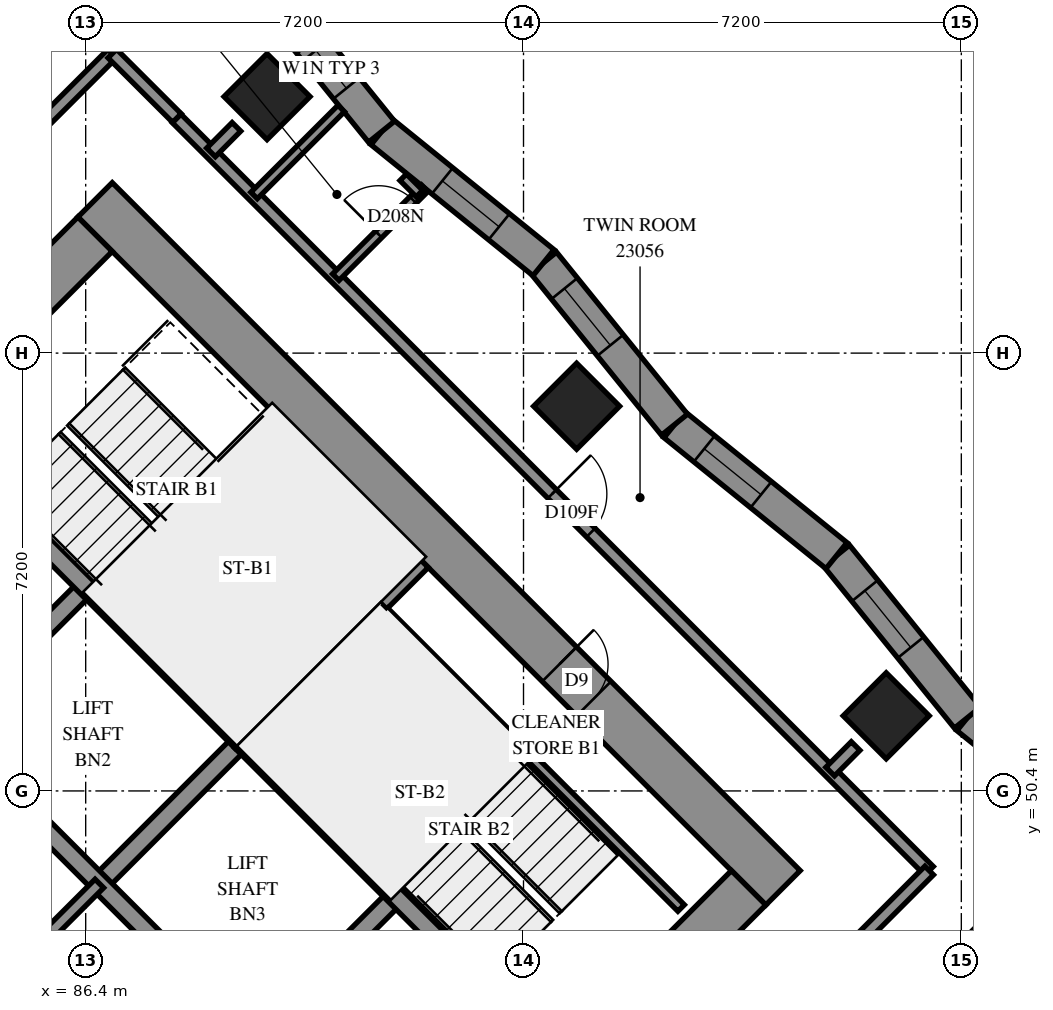
"""IFC4 building model, lengths in metres.
Left out: names, types, materials, properties, quantities, classifications, styles, units other than length and angle.
Written with IfcOpenShell. Run it as: python <this file> out.ifc"""

import sys

from ifc_helpers import new_model, si_unit, direction, frame, frame_2d, origin, origin_2d, place, context, subcontext, project, spatial, polyline, rectangle, outline, extrude, element, fill, save


model = new_model("IFC4")
c1 = context("Model", 3, precision=1e-05, world=origin(), true_north=direction((0.0, 1.0)))
c2 = subcontext(c1, "Body", "Model", "MODEL_VIEW")
j1 = project(units=[si_unit("LENGTHUNIT", "METRE"), si_unit("PLANEANGLEUNIT", "RADIAN")], contexts=[c1])
p1 = place(None, origin())
s1 = spatial("IfcSite", under=j1, at=p1, CompositionType="ELEMENT")
p2 = place(p1, origin())
s2 = spatial("IfcBuilding", under=s1, at=p2, CompositionType="ELEMENT")
p3 = place(p2, frame((0.0, 0.0, 88.0)))
s3 = spatial("IfcBuildingStorey", under=s2, at=p3, CompositionType="ELEMENT", Elevation=88.0)
for number, where, z_axis, x_axis in (
    (1, (89.382, 61.818, 0.0), (0.0, 0.0, 1.0), (0.707, -0.707, 0.0)),
    (2, (94.474, 56.727, 0.0), (0.0, 0.0, 1.0), (0.707, -0.707, 0.0)),
    (3, (99.565, 51.635, 0.0), (0.0, 0.0, 1.0), (0.707, -0.707, 0.0)),
):
    element("IfcColumn", number, at=place(p3, frame(where, z_axis=z_axis, x_axis=x_axis)), inside=s3, PredefinedType="COLUMN", context=c2, shape_type="SweptSolid", body=[
        extrude(rectangle(XDim=1.0, YDim=1.0, at=origin_2d()), origin(), (0.0, 0.0, 1.0), 3.1),
    ])
p4 = place(p3, frame((75.806, 49.373, -0.3), z_axis=(0.0, 0.0, 1.0), x_axis=(0.7071067812, -0.7071067812, 0.0)))
e4 = element("IfcWall", 4, at=p4, inside=s3, PredefinedType="SHEAR", context=c2, shape_type="SweptSolid", body=[
    extrude(rectangle(XDim=16.0, YDim=0.8, at=frame_2d((8.0, 0.0))), origin(), (0.0, 0.0, 1.0), 2.7),
])
p5 = place(p3, frame((86.554, 60.121, -0.3), z_axis=(0.0, 0.0, 1.0), x_axis=(0.7071067812, -0.7071067812, 0.0)))
e5 = element("IfcWall", 5, at=p5, inside=s3, PredefinedType="SHEAR", context=c2, shape_type="SweptSolid", body=[
    extrude(rectangle(XDim=16.0, YDim=0.8, at=frame_2d((8.0, 0.0))), origin(), (0.0, 0.0, 1.0), 2.7),
])
p6 = place(p5, frame((10.8, 0.0, 0.3)))
e6 = element("IfcOpeningElement", 6, at=p6, cuts=e5, PredefinedType="OPENING", context=c2, shape_type="SweptSolid", body=[
    extrude(rectangle(XDim=0.8, YDim=2.1, at=frame_2d((0.4, 1.05))), frame((0.0, 0.41, 0.0), z_axis=(0.0, -1.0, 0.0), x_axis=(1.0, 0.0, 0.0)), (0.0, 0.0, 1.0), 0.82),
])
p7 = place(p3, frame((76.372, 49.373, -0.3), z_axis=(0.0, 0.0, 1.0), x_axis=(0.7071067812, 0.7071067812, 0.0)))
e7 = element("IfcWall", 7, at=p7, inside=s3, PredefinedType="SHEAR", context=c2, shape_type="SweptSolid", body=[
    extrude(rectangle(XDim=14.4, YDim=0.8, at=frame_2d((7.2, 0.0))), origin(), (0.0, 0.0, 1.0), 2.7),
])
p8 = place(p7, frame((4.55, 0.0, 0.3)))
e8 = element("IfcOpeningElement", 8, at=p8, cuts=e7, PredefinedType="OPENING", context=c2, shape_type="SweptSolid", body=[
    extrude(rectangle(XDim=1.1, YDim=2.1, at=frame_2d((0.55, 1.05))), frame((0.0, 0.41, 0.0), z_axis=(0.0, -1.0, 0.0), x_axis=(1.0, 0.0, 0.0)), (0.0, 0.0, 1.0), 0.82),
])
p9 = place(p7, frame((11.35, 0.0, 0.3)))
e9 = element("IfcOpeningElement", 9, at=p9, cuts=e7, PredefinedType="OPENING", context=c2, shape_type="SweptSolid", body=[
    extrude(rectangle(XDim=1.1, YDim=2.1, at=frame_2d((0.55, 1.05))), frame((0.0, 0.41, 0.0), z_axis=(0.0, -1.0, 0.0), x_axis=(1.0, 0.0, 0.0)), (0.0, 0.0, 1.0), 0.82),
])
p10 = place(p3, frame((87.12, 38.625, -0.3), z_axis=(0.0, 0.0, 1.0), x_axis=(0.7071067812, 0.7071067812, 0.0)))
e10 = element("IfcWall", 10, at=p10, inside=s3, PredefinedType="SHEAR", context=c2, shape_type="SweptSolid", body=[
    extrude(rectangle(XDim=14.4, YDim=0.8, at=frame_2d((7.2, 0.0))), origin(), (0.0, 0.0, 1.0), 2.7),
])
p11 = place(p10, frame((4.55, 0.0, 0.3)))
e11 = element("IfcOpeningElement", 11, at=p11, cuts=e10, PredefinedType="OPENING", context=c2, shape_type="SweptSolid", body=[
    extrude(rectangle(XDim=1.1, YDim=2.1, at=frame_2d((0.55, 1.05))), frame((0.0, 0.41, 0.0), z_axis=(0.0, -1.0, 0.0), x_axis=(1.0, 0.0, 0.0)), (0.0, 0.0, 1.0), 0.82),
])
p12 = place(p10, frame((11.35, 0.0, 0.3)))
e12 = element("IfcOpeningElement", 12, at=p12, cuts=e10, PredefinedType="OPENING", context=c2, shape_type="SweptSolid", body=[
    extrude(rectangle(XDim=1.1, YDim=2.1, at=frame_2d((0.55, 1.05))), frame((0.0, 0.41, 0.0), z_axis=(0.0, -1.0, 0.0), x_axis=(1.0, 0.0, 0.0)), (0.0, 0.0, 1.0), 0.82),
])
p13 = place(p3, frame((84.079, 51.423, 0.0), z_axis=(0.0, 0.0, 1.0), x_axis=(0.7071219326, 0.7070916295, 0.0)))
e13 = element("IfcWall", 13, at=p13, inside=s3, PredefinedType="SOLIDWALL", context=c2, shape_type="SweptSolid", body=[
    extrude(rectangle(XDim=3.3, YDim=0.3, at=frame_2d((1.65, 0.0))), origin(), (0.0, 0.0, 1.0), 3.1),
])
for number, where, z_axis, x_axis in (
    (14, (86.625, 48.878, 0.0), (0.0, 0.0, 1.0), (0.707, 0.707, 0.0)),
    (15, (89.17, 46.332, 0.0), (0.0, 0.0, 1.0), (0.707, 0.707, 0.0)),
):
    element("IfcWall", number, at=place(p3, frame(where, z_axis=z_axis, x_axis=x_axis)), inside=s3, PredefinedType="SOLIDWALL", context=c2, shape_type="SweptSolid", body=[
        extrude(rectangle(XDim=3.3, YDim=0.3, at=frame_2d((1.65, 0.0))), origin(), (0.0, 0.0, 1.0), 3.1),
    ])
p14 = place(p3, frame((78.988, 51.423, 0.0), z_axis=(0.0, 0.0, 1.0), x_axis=(0.7071067812, -0.7071067812, 0.0)))
e16 = element("IfcWall", 16, at=p14, inside=s3, PredefinedType="SOLIDWALL", context=c2, shape_type="SweptSolid", body=[
    extrude(rectangle(XDim=14.4, YDim=0.3, at=frame_2d((7.2, 0.0))), origin(), (0.0, 0.0, 1.0), 3.1),
])
p15 = place(p14, frame((1.25, 0.0, 0.0)))
e17 = element("IfcOpeningElement", 17, at=p15, cuts=e16, PredefinedType="OPENING", context=c2, shape_type="SweptSolid", body=[
    extrude(rectangle(XDim=1.1, YDim=2.1, at=frame_2d((0.55, 1.05))), frame((0.0, 0.16, 0.0), z_axis=(0.0, -1.0, 0.0), x_axis=(1.0, 0.0, 0.0)), (0.0, 0.0, 1.0), 0.32),
])
p16 = place(p14, frame((4.85, 0.0, 0.0)))
e18 = element("IfcOpeningElement", 18, at=p16, cuts=e16, PredefinedType="OPENING", context=c2, shape_type="SweptSolid", body=[
    extrude(rectangle(XDim=1.1, YDim=2.1, at=frame_2d((0.55, 1.05))), frame((0.0, 0.16, 0.0), z_axis=(0.0, -1.0, 0.0), x_axis=(1.0, 0.0, 0.0)), (0.0, 0.0, 1.0), 0.32),
])
p17 = place(p14, frame((8.45, 0.0, 0.0)))
e19 = element("IfcOpeningElement", 19, at=p17, cuts=e16, PredefinedType="OPENING", context=c2, shape_type="SweptSolid", body=[
    extrude(rectangle(XDim=1.1, YDim=2.1, at=frame_2d((0.55, 1.05))), frame((0.0, 0.16, 0.0), z_axis=(0.0, -1.0, 0.0), x_axis=(1.0, 0.0, 0.0)), (0.0, 0.0, 1.0), 0.32),
])
p18 = place(p14, frame((12.05, 0.0, 0.0)))
e20 = element("IfcOpeningElement", 20, at=p18, cuts=e16, PredefinedType="OPENING", context=c2, shape_type="SweptSolid", body=[
    extrude(rectangle(XDim=1.1, YDim=2.1, at=frame_2d((0.55, 1.05))), frame((0.0, 0.16, 0.0), z_axis=(0.0, -1.0, 0.0), x_axis=(1.0, 0.0, 0.0)), (0.0, 0.0, 1.0), 0.32),
])
p19 = place(p3, frame((81.534, 53.969, 0.0), z_axis=(0.0, 0.0, 1.0), x_axis=(0.707103309, -0.7071102534, 0.0)))
e21 = element("IfcWall", 21, at=p19, inside=s3, PredefinedType="SOLIDWALL", context=c2, shape_type="SweptSolid", body=[
    extrude(rectangle(XDim=14.4, YDim=0.3, at=frame_2d((7.2, 0.0))), origin(), (0.0, 0.0, 1.0), 3.1),
])
p20 = place(p19, frame((12.05, 0.0, 0.0)))
e22 = element("IfcOpeningElement", 22, at=p20, cuts=e21, PredefinedType="OPENING", context=c2, shape_type="SweptSolid", body=[
    extrude(rectangle(XDim=1.1, YDim=2.1, at=frame_2d((0.55, 1.05))), frame((0.0, 0.16, 0.0), z_axis=(0.0, -1.0, 0.0), x_axis=(1.0, 0.0, 0.0)), (0.0, 0.0, 1.0), 0.32),
])
for number, where, z_axis, x_axis in (
    (23, (83.867, 56.302, 0.0), (0.0, 0.0, 1.0), (0.707, -0.707, 0.0)),
    (24, (88.958, 51.211, 0.0), (0.0, 0.0, 1.0), (0.707, -0.707, 0.0)),
):
    element("IfcWall", number, at=place(p3, frame(where, z_axis=z_axis, x_axis=x_axis)), inside=s3, PredefinedType="SOLIDWALL", context=c2, shape_type="SweptSolid", body=[
        extrude(rectangle(XDim=7.2, YDim=0.3, at=frame_2d((3.6, 0.0))), origin(), (0.0, 0.0, 1.0), 3.1),
    ])
p21 = place(p3, frame((88.958, 51.211, 0.0), z_axis=(0.0, 0.0, 1.0), x_axis=(0.7071067812, 0.7071067812, 0.0)))
e25 = element("IfcWall", 25, at=p21, inside=s3, PredefinedType="SOLIDWALL", context=c2, shape_type="SweptSolid", body=[
    extrude(rectangle(XDim=4.2, YDim=0.3, at=frame_2d((2.1, 0.0))), origin(), (0.0, 0.0, 1.0), 3.1),
])
p22 = place(p3, frame((103.565, 49.452, 0.0), z_axis=(0.0, 0.0, 1.0), x_axis=(-0.777689233, 0.6286489138, 0.0)))
e26 = element("IfcWall", 26, at=p22, inside=s3, PredefinedType="SOLIDWALL", context=c2, shape_type="SweptSolid", body=[
    extrude(outline(polyline([(-0.029, -0.275), (3.397, -0.275), (3.455, 0.275), (0.029, 0.275), (-0.029, -0.275)])), origin(), (0.0, 0.0, 1.0), 3.1),
])
p23 = place(p22, frame((1.401, 0.0, 0.5)))
e27 = element("IfcOpeningElement", 27, at=p23, cuts=e26, PredefinedType="OPENING", context=c2, shape_type="SweptSolid", body=[
    extrude(rectangle(XDim=1.2, YDim=2.45, at=frame_2d((0.6, 1.225))), frame((0.0, 0.285, 0.0), z_axis=(0.0, -1.0, 0.0), x_axis=(1.0, 0.0, 0.0)), (0.0, 0.0, 1.0), 0.57),
])
p24 = place(p3, frame((100.901, 51.605, 0.0), z_axis=(0.0, 0.0, 1.0), x_axis=(-0.6286631845, 0.777677697, 0.0)))
e28 = element("IfcWall", 28, at=p24, inside=s3, PredefinedType="SOLIDWALL", context=c2, shape_type="SweptSolid", body=[
    extrude(outline(polyline([(0.029, -0.275), (3.455, -0.275), (3.397, 0.275), (-0.029, 0.275), (0.029, -0.275)])), origin(), (0.0, 0.0, 1.0), 3.1),
])
p25 = place(p24, frame((1.484, 0.0, 0.5)))
e29 = element("IfcOpeningElement", 29, at=p25, cuts=e28, PredefinedType="OPENING", context=c2, shape_type="SweptSolid", body=[
    extrude(rectangle(XDim=1.2, YDim=2.45, at=frame_2d((0.6, 1.225))), frame((0.0, 0.285, 0.0), z_axis=(0.0, -1.0, 0.0), x_axis=(1.0, 0.0, 0.0)), (0.0, 0.0, 1.0), 0.57),
])
p26 = place(p3, frame((98.747, 54.269, 0.0), z_axis=(0.0, 0.0, 1.0), x_axis=(-0.777677697, 0.6286631845, 0.0)))
e30 = element("IfcWall", 30, at=p26, inside=s3, PredefinedType="SOLIDWALL", context=c2, shape_type="SweptSolid", body=[
    extrude(outline(polyline([(-0.029, -0.275), (3.397, -0.275), (3.455, 0.275), (0.029, 0.275), (-0.029, -0.275)])), origin(), (0.0, 0.0, 1.0), 3.1),
])
p27 = place(p26, frame((1.596, 0.0, 0.5)))
e31 = element("IfcOpeningElement", 31, at=p27, cuts=e30, PredefinedType="OPENING", context=c2, shape_type="SweptSolid", body=[
    extrude(rectangle(XDim=1.2, YDim=2.45, at=frame_2d((0.6, 1.225))), frame((0.0, 0.285, 0.0), z_axis=(0.0, -1.0, 0.0), x_axis=(1.0, 0.0, 0.0)), (0.0, 0.0, 1.0), 0.57),
])
p28 = place(p3, frame((96.083, 56.423, 0.0), z_axis=(0.0, 0.0, 1.0), x_axis=(-0.6286489138, 0.777689233, 0.0)))
e32 = element("IfcWall", 32, at=p28, inside=s3, PredefinedType="SOLIDWALL", context=c2, shape_type="SweptSolid", body=[
    extrude(outline(polyline([(0.029, -0.275), (3.455, -0.275), (3.397, 0.275), (-0.029, 0.275), (0.029, -0.275)])), origin(), (0.0, 0.0, 1.0), 3.1),
])
p29 = place(p28, frame((1.678, 0.0, 0.5)))
e33 = element("IfcOpeningElement", 33, at=p29, cuts=e32, PredefinedType="OPENING", context=c2, shape_type="SweptSolid", body=[
    extrude(rectangle(XDim=1.2, YDim=2.45, at=frame_2d((0.6, 1.225))), frame((0.0, 0.285, 0.0), z_axis=(0.0, -1.0, 0.0), x_axis=(1.0, 0.0, 0.0)), (0.0, 0.0, 1.0), 0.57),
])
p30 = place(p3, frame((93.929, 59.087, 0.0), z_axis=(0.0, 0.0, 1.0), x_axis=(-0.777677697, 0.6286631845, 0.0)))
e34 = element("IfcWall", 34, at=p30, inside=s3, PredefinedType="SOLIDWALL", context=c2, shape_type="SweptSolid", body=[
    extrude(outline(polyline([(-0.029, -0.275), (3.397, -0.275), (3.455, 0.275), (0.029, 0.275), (-0.029, -0.275)])), origin(), (0.0, 0.0, 1.0), 3.1),
])
p31 = place(p30, frame((0.94, 0.0, 0.5)))
e35 = element("IfcOpeningElement", 35, at=p31, cuts=e34, PredefinedType="OPENING", context=c2, shape_type="SweptSolid", body=[
    extrude(rectangle(XDim=1.2, YDim=2.45, at=frame_2d((0.6, 1.225))), frame((0.0, 0.285, 0.0), z_axis=(0.0, -1.0, 0.0), x_axis=(1.0, 0.0, 0.0)), (0.0, 0.0, 1.0), 0.57),
])
p32 = place(p3, frame((91.265, 61.241, 0.0), z_axis=(0.0, 0.0, 1.0), x_axis=(-0.6286631845, 0.777677697, 0.0)))
e36 = element("IfcWall", 36, at=p32, inside=s3, PredefinedType="SOLIDWALL", context=c2, shape_type="SweptSolid", body=[
    extrude(outline(polyline([(0.029, -0.275), (3.455, -0.275), (3.397, 0.275), (-0.029, 0.275), (0.029, -0.275)])), origin(), (0.0, 0.0, 1.0), 3.1),
])
p33 = place(p32, frame((1.873, 0.0, 0.5)))
e37 = element("IfcOpeningElement", 37, at=p33, cuts=e36, PredefinedType="OPENING", context=c2, shape_type="SweptSolid", body=[
    extrude(rectangle(XDim=1.2, YDim=2.45, at=frame_2d((0.6, 1.225))), frame((0.0, 0.285, 0.0), z_axis=(0.0, -1.0, 0.0), x_axis=(1.0, 0.0, 0.0)), (0.0, 0.0, 1.0), 0.57),
])
p34 = place(p32, frame((0.918, 0.0, 0.45)))
e38 = element("IfcOpeningElement", 38, at=p34, cuts=e36, PredefinedType="OPENING", context=c2, shape_type="SweptSolid", body=[
    extrude(rectangle(XDim=0.8, YDim=2.5, at=frame_2d((0.4, 1.25))), frame((0.0, 0.285, 0.0), z_axis=(0.0, -1.0, 0.0), x_axis=(1.0, 0.0, 0.0)), (0.0, 0.0, 1.0), 0.57),
])
p35 = place(p3, frame((91.313, 53.354, 0.0), z_axis=(0.0, 0.0, 1.0), x_axis=(0.7071140275, -0.7070995348, 0.0)))
e39 = element("IfcWall", 39, at=p35, inside=s3, PredefinedType="PARTITIONING", context=c2, shape_type="SweptSolid", body=[
    extrude(rectangle(XDim=6.9, YDim=0.15, at=frame_2d((3.45, 0.0))), origin(), (0.0, 0.0, 1.0), 3.1),
])
p36 = place(p3, frame((84.079, 46.332, 0.0), z_axis=(0.0, 0.0, 1.0), x_axis=(0.7071067812, 0.7071067812, 0.0)))
e40 = element("IfcWall", 40, at=p36, inside=s3, PredefinedType="PARTITIONING", context=c2, shape_type="SweptSolid", body=[
    extrude(rectangle(XDim=3.6, YDim=0.2, at=frame_2d((1.8, 0.0))), origin(), (0.0, 0.0, 1.0), 3.1),
])
p37 = place(p3, frame((87.894, 61.461, 0.0), z_axis=(0.0, 0.0, 1.0), x_axis=(0.7071067812, -0.7071067812, 0.0)))
e41 = element("IfcWall", 41, at=p37, inside=s3, PredefinedType="PARTITIONING", context=c2, shape_type="SweptSolid", body=[
    extrude(rectangle(XDim=17.5, YDim=0.2, at=frame_2d((8.75, 0.0))), origin(), (0.0, 0.0, 1.0), 3.1),
])
p38 = place(p37, frame((8.735, 0.0, 0.0)))
e42 = element("IfcOpeningElement", 42, at=p38, cuts=e41, PredefinedType="OPENING", context=c2, shape_type="SweptSolid", body=[
    extrude(rectangle(XDim=0.9, YDim=2.1, at=frame_2d((0.45, 1.05))), frame((0.0, 0.11, 0.0), z_axis=(0.0, -1.0, 0.0), x_axis=(1.0, 0.0, 0.0)), (0.0, 0.0, 1.0), 0.22),
])
p39 = place(p3, frame((95.215, 42.197, 0.0), z_axis=(0.0, 0.0, 1.0), x_axis=(0.7071067812, 0.7071067812, 0.0)))
e43 = element("IfcWall", 43, at=p39, inside=s3, PredefinedType="PARTITIONING", context=c2, shape_type="SweptSolid", body=[
    extrude(rectangle(XDim=10.675, YDim=0.2, at=frame_2d((5.338, 0.0))), origin(), (0.0, 0.0, 1.0), 3.1),
])
p40 = place(p3, frame((80.949, 58.477, 0.0), z_axis=(0.0, 0.0, 1.0), x_axis=(0.7071122585, 0.7071013038, 0.0)))
e44 = element("IfcWall", 44, at=p40, inside=s3, PredefinedType="PARTITIONING", context=c2, shape_type="SweptSolid", body=[
    extrude(rectangle(XDim=9.129, YDim=0.2, at=frame_2d((4.564, 0.0))), origin(), (0.0, 0.0, 1.0), 3.1),
])
p41 = place(p3, frame((94.297, 43.117, 0.0), z_axis=(0.0, 0.0, 1.0), x_axis=(0.7071067812, 0.7071067812, 0.0)))
e45 = element("IfcWall", 45, at=p41, inside=s3, PredefinedType="PARTITIONING", context=c2, shape_type="SweptSolid", body=[
    extrude(rectangle(XDim=8.448, YDim=0.2, at=frame_2d((4.224, 0.0))), origin(), (0.0, 0.0, 1.0), 3.1),
])
p42 = place(p41, frame((0.242, 0.0, 0.0)))
e46 = element("IfcOpeningElement", 46, at=p42, cuts=e45, PredefinedType="OPENING", context=c2, shape_type="SweptSolid", body=[
    extrude(rectangle(XDim=1.0, YDim=2.1, at=frame_2d((0.5, 1.05))), frame((0.0, 0.11, 0.0), z_axis=(0.0, -1.0, 0.0), x_axis=(1.0, 0.0, 0.0)), (0.0, 0.0, 1.0), 0.22),
])
p43 = place(p3, frame((80.951, 56.641, 0.0), z_axis=(0.0, 0.0, 1.0), x_axis=(0.7071067812, 0.7071067812, 0.0)))
e47 = element("IfcWall", 47, at=p43, inside=s3, PredefinedType="PARTITIONING", context=c2, shape_type="SweptSolid", body=[
    extrude(rectangle(XDim=8.321, YDim=0.2, at=frame_2d((4.161, 0.0))), origin(), (0.0, 0.0, 1.0), 3.1),
])
p44 = place(p43, frame((0.816, 0.0, 0.0)))
e48 = element("IfcOpeningElement", 48, at=p44, cuts=e47, PredefinedType="OPENING", context=c2, shape_type="SweptSolid", body=[
    extrude(rectangle(XDim=1.0, YDim=2.1, at=frame_2d((0.5, 1.05))), frame((0.0, 0.11, 0.0), z_axis=(0.0, -1.0, 0.0), x_axis=(1.0, 0.0, 0.0)), (0.0, 0.0, 1.0), 0.22),
])
p45 = place(p3, frame((90.513, 58.849, 0.0), z_axis=(0.0, 0.0, 1.0), x_axis=(0.7071309413, 0.7070826202, 0.0)))
e49 = element("IfcWall", 49, at=p45, inside=s3, PredefinedType="PARTITIONING", context=c2, shape_type="SweptSolid", body=[
    extrude(rectangle(XDim=2.07, YDim=0.15, at=frame_2d((1.035, 0.0))), origin(), (0.0, 0.0, 1.0), 3.1),
])
p46 = place(p45, frame((0.996, 0.0, 0.0)))
e50 = element("IfcOpeningElement", 50, at=p46, cuts=e49, PredefinedType="OPENING", context=c2, shape_type="SweptSolid", body=[
    extrude(rectangle(XDim=0.8, YDim=2.1, at=frame_2d((0.4, 1.05))), frame((0.0, 0.085, 0.0), z_axis=(0.0, -1.0, 0.0), x_axis=(1.0, 0.0, 0.0)), (0.0, 0.0, 1.0), 0.17),
])
p47 = place(p3, frame((89.169, 60.193, 0.0), z_axis=(0.0, 0.0, 1.0), x_axis=(0.7076498168, 0.7065633282, 0.0)))
e51 = element("IfcWall", 51, at=p47, inside=s3, PredefinedType="PARTITIONING", context=c2, shape_type="SweptSolid", body=[
    extrude(rectangle(XDim=2.025, YDim=0.15, at=frame_2d((1.012, 0.0))), origin(), (0.0, 0.0, 1.0), 3.1),
])
p48 = place(p3, frame((86.838, 62.526, 0.0), z_axis=(0.0, 0.0, 1.0), x_axis=(0.70777292, -0.7064400143, 0.0)))
e52 = element("IfcWall", 52, at=p48, inside=s3, PredefinedType="PARTITIONING", context=c2, shape_type="SweptSolid", body=[
    extrude(rectangle(XDim=1.5, YDim=0.2, at=frame_2d((0.75, 0.0))), origin(), (0.0, 0.0, 1.0), 3.1),
])
for number, where, z_axis, x_axis in (
    (53, (88.461, 60.901, 0.0), (0.0, 0.0, 1.0), (0.705, 0.709, 0.0)),
    (54, (98.644, 50.718, 0.0), (0.0, 0.0, 1.0), (0.705, 0.709, 0.0)),
):
    element("IfcWall", number, at=place(p3, frame(where, z_axis=z_axis, x_axis=x_axis)), inside=s3, PredefinedType="PARTITIONING", context=c2, shape_type="SweptSolid", body=[
        extrude(rectangle(XDim=0.593, YDim=0.2, at=frame_2d((0.296, 0.0))), origin(), (0.0, 0.0, 1.0), 3.1),
    ])
p49 = place(p3, frame((91.621, 60.491, 0.0), z_axis=(0.0, 0.0, 1.0), x_axis=(0.7071067812, -0.7071067812, 0.0)))
e55 = element("IfcWall", 55, at=p49, inside=s3, PredefinedType="PARTITIONING", context=c2, shape_type="SweptSolid", body=[
    extrude(rectangle(XDim=0.379, YDim=0.15, at=frame_2d((0.19, 0.0))), origin(), (0.0, 0.0, 1.0), 3.1),
])
p50 = place(p25, origin())
e56 = element("IfcWindow", 56, at=p50, inside=s3, PartitioningType="SINGLE_PANEL", PredefinedType="WINDOW", context=c2, shape_type="SweptSolid", body=[
    extrude(rectangle(XDim=1.2, YDim=2.45, at=frame_2d((0.6, 1.225))), frame((0.0, 0.155, 0.0), z_axis=(0.0, -1.0, 0.0), x_axis=(1.0, 0.0, 0.0)), (0.0, 0.0, 1.0), 0.06),
])
fill(e29, e56)
p51 = place(p27, origin())
e57 = element("IfcWindow", 57, at=p51, inside=s3, PartitioningType="SINGLE_PANEL", PredefinedType="WINDOW", context=c2, shape_type="SweptSolid", body=[
    extrude(rectangle(XDim=1.2, YDim=2.45, at=frame_2d((0.6, 1.225))), frame((0.0, 0.155, 0.0), z_axis=(0.0, -1.0, 0.0), x_axis=(1.0, 0.0, 0.0)), (0.0, 0.0, 1.0), 0.06),
])
fill(e31, e57)
p52 = place(p29, origin())
e58 = element("IfcWindow", 58, at=p52, inside=s3, PartitioningType="SINGLE_PANEL", PredefinedType="WINDOW", context=c2, shape_type="SweptSolid", body=[
    extrude(rectangle(XDim=1.2, YDim=2.45, at=frame_2d((0.6, 1.225))), frame((0.0, 0.155, 0.0), z_axis=(0.0, -1.0, 0.0), x_axis=(1.0, 0.0, 0.0)), (0.0, 0.0, 1.0), 0.06),
])
fill(e33, e58)
p53 = place(p31, origin())
e59 = element("IfcWindow", 59, at=p53, inside=s3, PartitioningType="SINGLE_PANEL", PredefinedType="WINDOW", context=c2, shape_type="SweptSolid", body=[
    extrude(rectangle(XDim=1.2, YDim=2.45, at=frame_2d((0.6, 1.225))), frame((0.0, 0.155, 0.0), z_axis=(0.0, -1.0, 0.0), x_axis=(1.0, 0.0, 0.0)), (0.0, 0.0, 1.0), 0.06),
])
fill(e35, e59)
p54 = place(p6, origin())
e60 = element("IfcDoor", 60, at=p54, inside=s3, OperationType="SINGLE_SWING_RIGHT", PredefinedType="DOOR", context=c2, shape_type="SweptSolid", body=[
    extrude(rectangle(XDim=0.8, YDim=2.1, at=frame_2d((0.4, 1.05))), frame((0.0, -0.34, 0.0), z_axis=(0.0, -1.0, 0.0), x_axis=(1.0, 0.0, 0.0)), (0.0, 0.0, 1.0), 0.05),
])
fill(e6, e60)
p55 = place(p38, origin())
e61 = element("IfcDoor", 61, at=p55, inside=s3, OperationType="SINGLE_SWING_LEFT", PredefinedType="DOOR", context=c2, shape_type="SweptSolid", body=[
    extrude(rectangle(XDim=0.9, YDim=2.1, at=frame_2d((0.45, 1.05))), frame((0.0, 0.025, 0.0), z_axis=(0.0, -1.0, 0.0), x_axis=(1.0, 0.0, 0.0)), (0.0, 0.0, 1.0), 0.05),
])
fill(e42, e61)
p56 = place(p46, origin())
e62 = element("IfcDoor", 62, at=p56, inside=s3, OperationType="SINGLE_SWING_RIGHT", PredefinedType="DOOR", context=c2, shape_type="SweptSolid", body=[
    extrude(rectangle(XDim=0.8, YDim=2.1, at=frame_2d((0.4, 1.05))), frame((0.0, 0.025, 0.0), z_axis=(0.0, -1.0, 0.0), x_axis=(1.0, 0.0, 0.0)), (0.0, 0.0, 1.0), 0.05),
])
fill(e50, e62)
p57 = place(p34, origin())
e63 = element("IfcWindow", 63, at=p57, inside=s3, PartitioningType="SINGLE_PANEL", PredefinedType="WINDOW", context=c2, shape_type="SweptSolid", body=[
    extrude(rectangle(XDim=0.8, YDim=2.5, at=frame_2d((0.4, 1.25))), frame((0.0, 0.155, 0.0), z_axis=(0.0, -1.0, 0.0), x_axis=(1.0, 0.0, 0.0)), (0.0, 0.0, 1.0), 0.06),
])
fill(e38, e63)
save(model, sys.argv[1])
